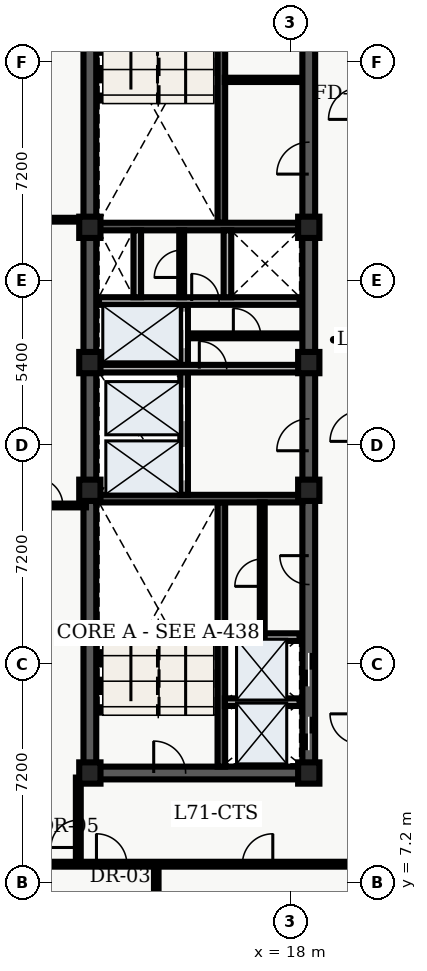
"""IFC4 building model, lengths in metres.
Left out: names, types, materials, properties, quantities, classifications, styles, units other than length and angle.
Written with IfcOpenShell. Run it as: python <this file> out.ifc"""

import sys

from ifc_helpers import new_model, entity, si_unit, converted_unit, direction, frame, origin_with_axes, origin_2d_with_axis, place, context, subcontext, project, spatial, polyline, rectangle, outline, extrude, element, fill, save


model = new_model("IFC4")
c1 = context("Model", 3, precision=1e-05, world=origin_with_axes(), true_north=direction((0.0, 1.0)))
c2 = subcontext(c1, "Body", "Model", "MODEL_VIEW")
j1 = project(units=[si_unit("LENGTHUNIT", "METRE"), converted_unit("PLANEANGLEUNIT", "DEGREE", entity("IfcPlaneAngleMeasure", 0.017), si_unit("PLANEANGLEUNIT", "RADIAN"), dimensions=[0, 0, 0, 0, 0, 0, 0])], contexts=[c1])
p1 = place(None, origin_with_axes())
s1 = spatial("IfcSite", under=j1, at=p1, CompositionType="ELEMENT")
p2 = place(p1, origin_with_axes())
s2 = spatial("IfcBuilding", under=s1, at=p2, CompositionType="ELEMENT")
p3 = place(p2, frame((0.0, 0.0, 288.0), z_axis=(0.0, 0.0, 1.0), x_axis=(1.0, 0.0, 0.0)))
s3 = spatial("IfcBuildingStorey", under=s2, at=p3, CompositionType="ELEMENT", Elevation=288.0)
p4 = place(p3, frame((11.4, 10.8, 0.0), z_axis=(0.0, 0.0, 1.0), x_axis=(0.0, 1.0, 0.0)))
e1 = element("IfcWall", 1, at=p4, inside=s3, PredefinedType="SHEAR", context=c2, shape_type="SweptSolid", body=[
    extrude(outline(polyline([(0.0, -0.21), (27.0, -0.21), (27.0, 0.21), (0.0, 0.21), (0.0, -0.21)])), origin_with_axes(), (0.0, 0.0, 1.0), 3.66),
])
p5 = place(p3, frame((11.4, 10.8, 0.0), z_axis=(0.0, 0.0, 1.0), x_axis=(1.0, 0.0, 0.0)))
e2 = element("IfcWall", 2, at=p5, inside=s3, PredefinedType="SHEAR", context=c2, shape_type="SweptSolid", body=[
    extrude(outline(polyline([(0.0, -0.21), (7.2, -0.21), (7.2, 0.21), (0.0, 0.21), (0.0, -0.21)])), origin_with_axes(), (0.0, 0.0, 1.0), 3.66),
])
p6 = place(p5, frame((2.625, 0.0, 0.0), z_axis=(0.0, 0.0, 1.0), x_axis=(1.0, 0.0, 0.0)))
e3 = element("IfcOpeningElement", 3, at=p6, cuts=e2, PredefinedType="OPENING", context=c2, shape_type="SweptSolid", body=[
    extrude(rectangle(XDim=1.05, YDim=0.44, at=origin_2d_with_axis()), origin_with_axes(), (0.0, 0.0, 1.0), 2.15),
])
p7 = place(p3, frame((18.6, 10.8, 0.0), z_axis=(0.0, 0.0, 1.0), x_axis=(0.0, 1.0, 0.0)))
e4 = element("IfcWall", 4, at=p7, inside=s3, PredefinedType="SHEAR", context=c2, shape_type="SweptSolid", body=[
    extrude(outline(polyline([(0.0, -0.21), (13.5, -0.21), (13.5, 0.21), (0.0, 0.21), (0.0, -0.21)])), origin_with_axes(), (0.0, 0.0, 1.0), 3.66),
])
p8 = place(p7, frame((1.3, 0.0, 0.0), z_axis=(0.0, 0.0, 1.0), x_axis=(1.0, 0.0, 0.0)))
e5 = element("IfcOpeningElement", 5, at=p8, cuts=e4, PredefinedType="OPENING", context=c2, shape_type="SweptSolid", body=[
    extrude(rectangle(XDim=1.1, YDim=0.44, at=origin_2d_with_axis()), origin_with_axes(), (0.0, 0.0, 1.0), 2.15),
])
p9 = place(p7, frame((3.4, 0.0, 0.0), z_axis=(0.0, 0.0, 1.0), x_axis=(1.0, 0.0, 0.0)))
e6 = element("IfcOpeningElement", 6, at=p9, cuts=e4, PredefinedType="OPENING", context=c2, shape_type="SweptSolid", body=[
    extrude(rectangle(XDim=1.1, YDim=0.44, at=origin_2d_with_axis()), origin_with_axes(), (0.0, 0.0, 1.0), 2.15),
])
p10 = place(p7, frame((11.125, 0.0, 0.0), z_axis=(0.0, 0.0, 1.0), x_axis=(1.0, 0.0, 0.0)))
e7 = element("IfcOpeningElement", 7, at=p10, cuts=e4, PredefinedType="OPENING", context=c2, shape_type="SweptSolid", body=[
    extrude(rectangle(XDim=1.05, YDim=0.44, at=origin_2d_with_axis()), origin_with_axes(), (0.0, 0.0, 1.0), 2.15),
])
p11 = place(p7, frame((6.675, 0.0, 0.0), z_axis=(0.0, 0.0, 1.0), x_axis=(1.0, 0.0, 0.0)))
e8 = element("IfcOpeningElement", 8, at=p11, cuts=e4, PredefinedType="OPENING", context=c2, shape_type="SweptSolid", body=[
    extrude(rectangle(XDim=0.95, YDim=0.44, at=origin_2d_with_axis()), origin_with_axes(), (0.0, 0.0, 1.0), 2.15),
])
p12 = place(p3, frame((18.6, 24.3, 0.0), z_axis=(0.0, 0.0, 1.0), x_axis=(0.0, 1.0, 0.0)))
e9 = element("IfcWall", 9, at=p12, inside=s3, PredefinedType="SHEAR", context=c2, shape_type="SweptSolid", body=[
    extrude(outline(polyline([(0.0, -0.21), (13.5, -0.21), (13.5, 0.21), (0.0, 0.21), (0.0, -0.21)])), origin_with_axes(), (0.0, 0.0, 1.0), 3.66),
])
p13 = place(p12, frame((6.725, 0.0, 0.0), z_axis=(0.0, 0.0, 1.0), x_axis=(1.0, 0.0, 0.0)))
e10 = element("IfcOpeningElement", 10, at=p13, cuts=e9, PredefinedType="OPENING", context=c2, shape_type="SweptSolid", body=[
    extrude(rectangle(XDim=1.05, YDim=0.44, at=origin_2d_with_axis()), origin_with_axes(), (0.0, 0.0, 1.0), 2.15),
])
p14 = place(p12, frame((11.125, 0.0, 0.0), z_axis=(0.0, 0.0, 1.0), x_axis=(1.0, 0.0, 0.0)))
e11 = element("IfcOpeningElement", 11, at=p14, cuts=e9, PredefinedType="OPENING", context=c2, shape_type="SweptSolid", body=[
    extrude(rectangle(XDim=1.05, YDim=0.44, at=origin_2d_with_axis()), origin_with_axes(), (0.0, 0.0, 1.0), 2.15),
])
p15 = place(p3, frame((15.725, 11.01, 0.0), z_axis=(0.0, 0.0, 1.0), x_axis=(0.0, 1.0, 0.0)))
e12 = element("IfcWall", 12, at=p15, inside=s3, PredefinedType="SHEAR", context=c2, shape_type="SweptSolid", body=[
    extrude(outline(polyline([(0.0, -0.125), (8.69, -0.125), (8.69, 0.125), (0.0, 0.125), (0.0, -0.125)])), origin_with_axes(), (0.0, 0.0, 1.0), 3.66),
])
p16 = place(p3, frame((11.61, 19.825, 0.0), z_axis=(0.0, 0.0, 1.0), x_axis=(1.0, 0.0, 0.0)))
e13 = element("IfcWall", 13, at=p16, inside=s3, PredefinedType="SHEAR", context=c2, shape_type="SweptSolid", body=[
    extrude(outline(polyline([(0.0, -0.125), (6.78, -0.125), (6.78, 0.125), (0.0, 0.125), (0.0, -0.125)])), origin_with_axes(), (0.0, 0.0, 1.0), 3.66),
])
p17 = place(p3, frame((15.725, 28.9, 0.0), z_axis=(0.0, 0.0, 1.0), x_axis=(0.0, 1.0, 0.0)))
e14 = element("IfcWall", 14, at=p17, inside=s3, PredefinedType="SHEAR", context=c2, shape_type="SweptSolid", body=[
    extrude(outline(polyline([(0.0, -0.125), (8.69, -0.125), (8.69, 0.125), (0.0, 0.125), (0.0, -0.125)])), origin_with_axes(), (0.0, 0.0, 1.0), 3.66),
])
p18 = place(p3, frame((11.61, 28.775, 0.0), z_axis=(0.0, 0.0, 1.0), x_axis=(1.0, 0.0, 0.0)))
e15 = element("IfcWall", 15, at=p18, inside=s3, PredefinedType="SHEAR", context=c2, shape_type="SweptSolid", body=[
    extrude(outline(polyline([(0.0, -0.125), (6.78, -0.125), (6.78, 0.125), (0.0, 0.125), (0.0, -0.125)])), origin_with_axes(), (0.0, 0.0, 1.0), 3.66),
])
p19 = place(p3, frame((14.5, 19.95, 0.0), z_axis=(0.0, 0.0, 1.0), x_axis=(0.0, 1.0, 0.0)))
e16 = element("IfcWall", 16, at=p19, inside=s3, PredefinedType="SOLIDWALL", context=c2, shape_type="SweptSolid", body=[
    extrude(outline(polyline([(0.0, -0.125), (6.25, -0.125), (6.25, 0.125), (0.0, 0.125), (0.0, -0.125)])), origin_with_axes(), (0.0, 0.0, 1.0), 2.7),
])
p20 = place(p19, frame((1.025, 0.0, 0.0), z_axis=(0.0, 0.0, 1.0), x_axis=(1.0, 0.0, 0.0)))
e17 = element("IfcOpeningElement", 17, at=p20, cuts=e16, PredefinedType="OPENING", context=c2, shape_type="SweptSolid", body=[
    extrude(rectangle(XDim=1.1, YDim=0.27, at=origin_2d_with_axis()), origin_with_axes(), (0.0, 0.0, 1.0), 2.15),
])
p21 = place(p19, frame((2.975, 0.0, 0.0), z_axis=(0.0, 0.0, 1.0), x_axis=(1.0, 0.0, 0.0)))
e18 = element("IfcOpeningElement", 18, at=p21, cuts=e16, PredefinedType="OPENING", context=c2, shape_type="SweptSolid", body=[
    extrude(rectangle(XDim=1.1, YDim=0.27, at=origin_2d_with_axis()), origin_with_axes(), (0.0, 0.0, 1.0), 2.15),
])
p22 = place(p19, frame((5.425, 0.0, 0.0), z_axis=(0.0, 0.0, 1.0), x_axis=(1.0, 0.0, 0.0)))
e19 = element("IfcOpeningElement", 19, at=p22, cuts=e16, PredefinedType="OPENING", context=c2, shape_type="SweptSolid", body=[
    extrude(rectangle(XDim=1.2, YDim=0.27, at=origin_2d_with_axis()), origin_with_axes(), (0.0, 0.0, 1.0), 2.15),
])
p23 = place(p3, frame((11.7, 24.1, 0.0), z_axis=(0.0, 0.0, 1.0), x_axis=(1.0, 0.0, 0.0)))
e20 = element("IfcWall", 20, at=p23, inside=s3, PredefinedType="SOLIDWALL", context=c2, shape_type="SweptSolid", body=[
    extrude(outline(polyline([(0.0, -0.125), (6.6, -0.125), (6.6, 0.125), (0.0, 0.125), (0.0, -0.125)])), origin_with_axes(), (0.0, 0.0, 1.0), 2.7),
])
p24 = place(p23, frame((3.75, 0.0, 0.0), z_axis=(0.0, 0.0, 1.0), x_axis=(1.0, 0.0, 0.0)))
e21 = element("IfcOpeningElement", 21, at=p24, cuts=e20, PredefinedType="OPENING", context=c2, shape_type="SweptSolid", body=[
    extrude(rectangle(XDim=0.9, YDim=0.27, at=origin_2d_with_axis()), origin_with_axes(), (0.0, 0.0, 1.0), 2.15),
])
p25 = place(p3, frame((11.7, 26.325, 0.0), z_axis=(0.0, 0.0, 1.0), x_axis=(1.0, 0.0, 0.0)))
e22 = element("IfcWall", 22, at=p25, inside=s3, PredefinedType="SOLIDWALL", context=c2, shape_type="SweptSolid", body=[
    extrude(outline(polyline([(0.0, -0.125), (6.6, -0.125), (6.6, 0.125), (0.0, 0.125), (0.0, -0.125)])), origin_with_axes(), (0.0, 0.0, 1.0), 2.7),
])
p26 = place(p25, frame((3.5, 0.0, 0.0), z_axis=(0.0, 0.0, 1.0), x_axis=(1.0, 0.0, 0.0)))
e23 = element("IfcOpeningElement", 23, at=p26, cuts=e22, PredefinedType="OPENING", context=c2, shape_type="SweptSolid", body=[
    extrude(rectangle(XDim=0.9, YDim=0.27, at=origin_2d_with_axis()), origin_with_axes(), (0.0, 0.0, 1.0), 2.15),
])
for number, where, z_axis, x_axis in (
    (24, (12.96, 26.45, 0.0), (0.0, 0.0, 1.0), (0.0, 1.0, 0.0)),
    (25, (15.925, 26.45, 0.0), (0.0, 0.0, 1.0), (0.0, 1.0, 0.0)),
):
    element("IfcWall", number, at=place(p3, frame(where, z_axis=z_axis, x_axis=x_axis)), inside=s3, PredefinedType="SOLIDWALL", context=c2, shape_type="SweptSolid", body=[
        extrude(outline(polyline([(0.0, -0.125), (2.2, -0.125), (2.2, 0.125), (0.0, 0.125), (0.0, -0.125)])), origin_with_axes(), (0.0, 0.0, 1.0), 2.7),
    ])
for number, where, z_axis, x_axis in (
    (26, (11.4, 10.8, 0.0), (0.0, 0.0, 1.0), (1.0, 0.0, 0.0)),
    (27, (11.4, 20.1, 0.0), (0.0, 0.0, 1.0), (1.0, 0.0, 0.0)),
    (28, (11.4, 24.3, 0.0), (0.0, 0.0, 1.0), (1.0, 0.0, 0.0)),
    (29, (11.4, 28.75, 0.0), (0.0, 0.0, 1.0), (1.0, 0.0, 0.0)),
    (30, (18.6, 10.8, 0.0), (0.0, 0.0, 1.0), (1.0, 0.0, 0.0)),
    (31, (18.6, 20.1, 0.0), (0.0, 0.0, 1.0), (1.0, 0.0, 0.0)),
    (32, (18.6, 24.3, 0.0), (0.0, 0.0, 1.0), (1.0, 0.0, 0.0)),
    (33, (18.6, 28.75, 0.0), (0.0, 0.0, 1.0), (1.0, 0.0, 0.0)),
):
    element("IfcColumn", number, at=place(p3, frame(where, z_axis=z_axis, x_axis=x_axis)), inside=s3, PredefinedType="COLUMN", context=c2, shape_type="SweptSolid", body=[
        extrude(rectangle(XDim=0.7, YDim=0.7, at=origin_2d_with_axis()), origin_with_axes(), (0.0, 0.0, 1.0), 3.9),
    ])
p27 = place(p3, frame((14.62, 25.18, 0.0), z_axis=(0.0, 0.0, 1.0), x_axis=(1.0, 0.0, 0.0)))
e34 = element("IfcWall", 34, at=p27, inside=s3, PredefinedType="PARTITIONING", context=c2, shape_type="SweptSolid", body=[
    extrude(outline(polyline([(0.0, -0.08), (3.68, -0.08), (3.68, 0.08), (0.0, 0.08), (0.0, -0.08)])), origin_with_axes(), (0.0, 0.0, 1.0), 2.7),
])
p28 = place(p27, frame((1.95, 0.0, 0.0), z_axis=(0.0, 0.0, 1.0), x_axis=(1.0, 0.0, 0.0)))
e35 = element("IfcOpeningElement", 35, at=p28, cuts=e34, PredefinedType="OPENING", context=c2, shape_type="SweptSolid", body=[
    extrude(rectangle(XDim=0.9, YDim=0.18, at=origin_2d_with_axis()), origin_with_axes(), (0.0, 0.0, 1.0), 2.15),
])
p29 = place(p3, frame((14.42, 26.45, 0.0), z_axis=(0.0, 0.0, 1.0), x_axis=(0.0, 1.0, 0.0)))
e36 = element("IfcWall", 36, at=p29, inside=s3, PredefinedType="PARTITIONING", context=c2, shape_type="SweptSolid", body=[
    extrude(outline(polyline([(0.0, -0.08), (2.2, -0.08), (2.2, 0.08), (0.0, 0.08), (0.0, -0.08)])), origin_with_axes(), (0.0, 0.0, 1.0), 2.7),
])
p30 = place(p29, frame((1.1, 0.0, 0.0), z_axis=(0.0, 0.0, 1.0), x_axis=(1.0, 0.0, 0.0)))
e37 = element("IfcOpeningElement", 37, at=p30, cuts=e36, PredefinedType="OPENING", context=c2, shape_type="SweptSolid", body=[
    extrude(rectangle(XDim=0.9, YDim=0.18, at=origin_2d_with_axis()), origin_with_axes(), (0.0, 0.0, 1.0), 2.15),
])
for number, where, z_axis, x_axis in (
    (38, (15.84, 13.13, 0.0), (0.0, 0.0, 1.0), (1.0, 0.0, 0.0)),
    (39, (15.84, 15.27, 0.0), (0.0, 0.0, 1.0), (1.0, 0.0, 0.0)),
):
    element("IfcWall", number, at=place(p3, frame(where, z_axis=z_axis, x_axis=x_axis)), inside=s3, PredefinedType="SOLIDWALL", context=c2, shape_type="SweptSolid", body=[
        extrude(outline(polyline([(0.0, -0.125), (2.46, -0.125), (2.46, 0.125), (0.0, 0.125), (0.0, -0.125)])), origin_with_axes(), (0.0, 0.0, 1.0), 2.7),
    ])
p31 = place(p3, frame((17.07, 15.34, 0.0), z_axis=(0.0, 0.0, 1.0), x_axis=(0.0, 1.0, 0.0)))
e40 = element("IfcWall", 40, at=p31, inside=s3, PredefinedType="PARTITIONING", context=c2, shape_type="SweptSolid", body=[
    extrude(outline(polyline([(0.0, -0.08), (4.36, -0.08), (4.36, 0.08), (0.0, 0.08), (0.0, -0.08)])), origin_with_axes(), (0.0, 0.0, 1.0), 2.7),
])
p32 = place(p31, frame((2.05, 0.0, 0.0), z_axis=(0.0, 0.0, 1.0), x_axis=(1.0, 0.0, 0.0)))
e41 = element("IfcOpeningElement", 41, at=p32, cuts=e40, PredefinedType="OPENING", context=c2, shape_type="SweptSolid", body=[
    extrude(rectangle(XDim=0.9, YDim=0.18, at=origin_2d_with_axis()), origin_with_axes(), (0.0, 0.0, 1.0), 2.15),
])
p33 = place(p3, frame((15.84, 33.6, 0.0), z_axis=(0.0, 0.0, 1.0), x_axis=(1.0, 0.0, 0.0)))
e42 = element("IfcWall", 42, at=p33, inside=s3, PredefinedType="PARTITIONING", context=c2, shape_type="SweptSolid", body=[
    extrude(outline(polyline([(0.0, -0.07), (2.46, -0.07), (2.46, 0.07), (0.0, 0.07), (0.0, -0.07)])), origin_with_axes(), (0.0, 0.0, 1.0), 2.7),
])
p34 = place(p3, frame((8.135, 7.8, 0.0), z_axis=(0.0, 0.0, 1.0), x_axis=(1.0, 0.0, 0.0)))
e43 = element("IfcWall", 43, at=p34, inside=s3, PredefinedType="PARTITIONING", context=c2, shape_type="SweptSolid", body=[
    extrude(outline(polyline([(0.0, -0.08), (12.165, -0.08), (12.165, 0.08), (0.0, 0.08), (0.0, -0.08)])), origin_with_axes(), (0.0, 0.0, 1.0), 2.7),
])
p35 = place(p34, frame((3.982, 0.0, 0.0), z_axis=(0.0, 0.0, 1.0), x_axis=(1.0, 0.0, 0.0)))
e44 = element("IfcOpeningElement", 44, at=p35, cuts=e43, PredefinedType="OPENING", context=c2, shape_type="SweptSolid", body=[
    extrude(rectangle(XDim=1.0, YDim=0.18, at=origin_2d_with_axis()), origin_with_axes(), (0.0, 0.0, 1.0), 2.15),
])
p36 = place(p34, frame((8.782, 0.0, 0.0), z_axis=(0.0, 0.0, 1.0), x_axis=(1.0, 0.0, 0.0)))
e45 = element("IfcOpeningElement", 45, at=p36, cuts=e43, PredefinedType="OPENING", context=c2, shape_type="SweptSolid", body=[
    extrude(rectangle(XDim=1.0, YDim=0.18, at=origin_2d_with_axis()), origin_with_axes(), (0.0, 0.0, 1.0), 2.15),
])
p37 = place(p3, frame((11.02, 7.8, 0.0), z_axis=(0.0, 0.0, 1.0), x_axis=(0.0, 1.0, 0.0)))
e46 = element("IfcWall", 46, at=p37, inside=s3, PredefinedType="PARTITIONING", context=c2, shape_type="SweptSolid", body=[
    extrude(outline(polyline([(0.0, -0.08), (2.85, -0.08), (2.85, 0.08), (0.0, 0.08), (0.0, -0.08)])), origin_with_axes(), (0.0, 0.0, 1.0), 2.7),
])
p38 = place(p37, frame((1.0, 0.0, 0.0), z_axis=(0.0, 0.0, 1.0), x_axis=(1.0, 0.0, 0.0)))
e47 = element("IfcOpeningElement", 47, at=p38, cuts=e46, PredefinedType="OPENING", context=c2, shape_type="SweptSolid", body=[
    extrude(rectangle(XDim=0.9, YDim=0.18, at=origin_2d_with_axis()), origin_with_axes(), (0.0, 0.0, 1.0), 2.15),
])
p39 = place(p3, frame((8.135, 19.6, 0.0), z_axis=(0.0, 0.0, 1.0), x_axis=(1.0, 0.0, 0.0)))
e48 = element("IfcWall", 48, at=p39, inside=s3, PredefinedType="PARTITIONING", context=c2, shape_type="SweptSolid", body=[
    extrude(outline(polyline([(0.0, -0.062), (3.135, -0.062), (3.135, 0.062), (0.0, 0.062), (0.0, -0.062)])), origin_with_axes(), (0.0, 0.0, 1.0), 2.7),
])
p40 = place(p39, frame((1.925, 0.0, 0.0), z_axis=(0.0, 0.0, 1.0), x_axis=(1.0, 0.0, 0.0)))
e49 = element("IfcOpeningElement", 49, at=p40, cuts=e48, PredefinedType="OPENING", context=c2, shape_type="SweptSolid", body=[
    extrude(rectangle(XDim=0.9, YDim=0.145, at=origin_2d_with_axis()), origin_with_axes(), (0.0, 0.0, 1.0), 2.15),
])
p41 = place(p3, frame((8.135, 29.0, 0.0), z_axis=(0.0, 0.0, 1.0), x_axis=(1.0, 0.0, 0.0)))
e50 = element("IfcWall", 50, at=p41, inside=s3, PredefinedType="PARTITIONING", context=c2, shape_type="SweptSolid", body=[
    extrude(outline(polyline([(0.0, -0.062), (3.135, -0.062), (3.135, 0.062), (0.0, 0.062), (0.0, -0.062)])), origin_with_axes(), (0.0, 0.0, 1.0), 2.7),
])
p42 = place(p3, frame((13.584, 2.58, 0.0), z_axis=(0.0, 0.0, 1.0), x_axis=(0.0, 1.0, 0.0)))
e51 = element("IfcWall", 51, at=p42, inside=s3, PredefinedType="PARTITIONING", context=c2, shape_type="SweptSolid", body=[
    extrude(outline(polyline([(0.0, -0.075), (5.12, -0.075), (5.12, 0.075), (0.0, 0.075), (0.0, -0.075)])), origin_with_axes(), (0.0, 0.0, 1.0), 2.7),
])
p43 = place(p7, frame((1.3, 0.0, 0.0), z_axis=(0.0, 0.0, 1.0), x_axis=(1.0, 0.0, 0.0)))
e52 = element("IfcDoor", 52, at=p43, inside=s3, OperationType="SLIDING_TO_LEFT", PredefinedType="DOOR", context=c2, shape_type="SweptSolid", body=[
    extrude(rectangle(XDim=1.1, YDim=0.09, at=origin_2d_with_axis()), origin_with_axes(), (0.0, 0.0, 1.0), 2.15),
])
fill(e5, e52)
p44 = place(p7, frame((3.4, 0.0, 0.0), z_axis=(0.0, 0.0, 1.0), x_axis=(1.0, 0.0, 0.0)))
e53 = element("IfcDoor", 53, at=p44, inside=s3, OperationType="SLIDING_TO_RIGHT", PredefinedType="DOOR", context=c2, shape_type="SweptSolid", body=[
    extrude(rectangle(XDim=1.1, YDim=0.09, at=origin_2d_with_axis()), origin_with_axes(), (0.0, 0.0, 1.0), 2.15),
])
fill(e6, e53)
p45 = place(p19, frame((1.025, 0.0, 0.0), z_axis=(0.0, 0.0, 1.0), x_axis=(1.0, 0.0, 0.0)))
e54 = element("IfcDoor", 54, at=p45, inside=s3, OperationType="SLIDING_TO_LEFT", PredefinedType="DOOR", context=c2, shape_type="SweptSolid", body=[
    extrude(rectangle(XDim=1.1, YDim=0.09, at=origin_2d_with_axis()), origin_with_axes(), (0.0, 0.0, 1.0), 2.15),
])
fill(e17, e54)
p46 = place(p19, frame((2.975, 0.0, 0.0), z_axis=(0.0, 0.0, 1.0), x_axis=(1.0, 0.0, 0.0)))
e55 = element("IfcDoor", 55, at=p46, inside=s3, OperationType="SLIDING_TO_RIGHT", PredefinedType="DOOR", context=c2, shape_type="SweptSolid", body=[
    extrude(rectangle(XDim=1.1, YDim=0.09, at=origin_2d_with_axis()), origin_with_axes(), (0.0, 0.0, 1.0), 2.15),
])
fill(e18, e55)
p47 = place(p19, frame((5.425, 0.0, 0.0), z_axis=(0.0, 0.0, 1.0), x_axis=(1.0, 0.0, 0.0)))
e56 = element("IfcDoor", 56, at=p47, inside=s3, OperationType="DOUBLE_DOOR_SLIDING", PredefinedType="DOOR", context=c2, shape_type="SweptSolid", body=[
    extrude(rectangle(XDim=1.2, YDim=0.09, at=origin_2d_with_axis()), origin_with_axes(), (0.0, 0.0, 1.0), 2.15),
])
fill(e19, e56)
p48 = place(p5, frame((2.625, 0.0, 0.0), z_axis=(0.0, 0.0, 1.0), x_axis=(1.0, 0.0, 0.0)))
e57 = element("IfcDoor", 57, at=p48, inside=s3, OperationType="SINGLE_SWING_LEFT", PredefinedType="DOOR", context=c2, shape_type="SweptSolid", body=[
    extrude(rectangle(XDim=1.05, YDim=0.09, at=origin_2d_with_axis()), origin_with_axes(), (0.0, 0.0, 1.0), 2.15),
])
fill(e3, e57)
p49 = place(p7, frame((11.125, 0.0, 0.0), z_axis=(0.0, 0.0, 1.0), x_axis=(1.0, 0.0, 0.0)))
e58 = element("IfcDoor", 58, at=p49, inside=s3, OperationType="SINGLE_SWING_LEFT", PredefinedType="DOOR", context=c2, shape_type="SweptSolid", body=[
    extrude(rectangle(XDim=1.05, YDim=0.09, at=origin_2d_with_axis()), origin_with_axes(), (0.0, 0.0, 1.0), 2.15),
])
fill(e7, e58)
p50 = place(p25, frame((3.5, 0.0, 0.0), z_axis=(0.0, 0.0, 1.0), x_axis=(1.0, 0.0, 0.0)))
e59 = element("IfcDoor", 59, at=p50, inside=s3, OperationType="SINGLE_SWING_LEFT", PredefinedType="DOOR", context=c2, shape_type="SweptSolid", body=[
    extrude(rectangle(XDim=0.9, YDim=0.09, at=origin_2d_with_axis()), origin_with_axes(), (0.0, 0.0, 1.0), 2.15),
])
fill(e23, e59)
p51 = place(p29, frame((1.1, 0.0, 0.0), z_axis=(0.0, 0.0, 1.0), x_axis=(1.0, 0.0, 0.0)))
e60 = element("IfcDoor", 60, at=p51, inside=s3, OperationType="SINGLE_SWING_LEFT", PredefinedType="DOOR", context=c2, shape_type="SweptSolid", body=[
    extrude(rectangle(XDim=0.9, YDim=0.09, at=origin_2d_with_axis()), origin_with_axes(), (0.0, 0.0, 1.0), 2.15),
])
fill(e37, e60)
p52 = place(p23, frame((3.75, 0.0, 0.0), z_axis=(0.0, 0.0, 1.0), x_axis=(1.0, 0.0, 0.0)))
e61 = element("IfcDoor", 61, at=p52, inside=s3, OperationType="SINGLE_SWING_LEFT", PredefinedType="DOOR", context=c2, shape_type="SweptSolid", body=[
    extrude(rectangle(XDim=0.9, YDim=0.09, at=origin_2d_with_axis()), origin_with_axes(), (0.0, 0.0, 1.0), 2.15),
])
fill(e21, e61)
p53 = place(p27, frame((1.95, 0.0, 0.0), z_axis=(0.0, 0.0, 1.0), x_axis=(1.0, 0.0, 0.0)))
e62 = element("IfcDoor", 62, at=p53, inside=s3, OperationType="SINGLE_SWING_LEFT", PredefinedType="DOOR", context=c2, shape_type="SweptSolid", body=[
    extrude(rectangle(XDim=0.9, YDim=0.09, at=origin_2d_with_axis()), origin_with_axes(), (0.0, 0.0, 1.0), 2.15),
])
fill(e35, e62)
p54 = place(p31, frame((2.05, 0.0, 0.0), z_axis=(0.0, 0.0, 1.0), x_axis=(1.0, 0.0, 0.0)))
e63 = element("IfcDoor", 63, at=p54, inside=s3, OperationType="SINGLE_SWING_LEFT", PredefinedType="DOOR", context=c2, shape_type="SweptSolid", body=[
    extrude(rectangle(XDim=0.9, YDim=0.09, at=origin_2d_with_axis()), origin_with_axes(), (0.0, 0.0, 1.0), 2.15),
])
fill(e41, e63)
p55 = place(p7, frame((6.675, 0.0, 0.0), z_axis=(0.0, 0.0, 1.0), x_axis=(1.0, 0.0, 0.0)))
e64 = element("IfcDoor", 64, at=p55, inside=s3, OperationType="SINGLE_SWING_RIGHT", PredefinedType="DOOR", context=c2, shape_type="SweptSolid", body=[
    extrude(rectangle(XDim=0.95, YDim=0.09, at=origin_2d_with_axis()), origin_with_axes(), (0.0, 0.0, 1.0), 2.15),
])
fill(e8, e64)
p56 = place(p12, frame((6.725, 0.0, 0.0), z_axis=(0.0, 0.0, 1.0), x_axis=(1.0, 0.0, 0.0)))
e65 = element("IfcDoor", 65, at=p56, inside=s3, OperationType="SINGLE_SWING_LEFT", PredefinedType="DOOR", context=c2, shape_type="SweptSolid", body=[
    extrude(rectangle(XDim=1.05, YDim=0.09, at=origin_2d_with_axis()), origin_with_axes(), (0.0, 0.0, 1.0), 2.15),
])
fill(e10, e65)
p57 = place(p37, frame((1.0, 0.0, 0.0), z_axis=(0.0, 0.0, 1.0), x_axis=(1.0, 0.0, 0.0)))
e66 = element("IfcDoor", 66, at=p57, inside=s3, OperationType="SINGLE_SWING_LEFT", PredefinedType="DOOR", context=c2, shape_type="SweptSolid", body=[
    extrude(rectangle(XDim=0.9, YDim=0.09, at=origin_2d_with_axis()), origin_with_axes(), (0.0, 0.0, 1.0), 2.15),
])
fill(e47, e66)
p58 = place(p39, frame((1.925, 0.0, 0.0), z_axis=(0.0, 0.0, 1.0), x_axis=(1.0, 0.0, 0.0)))
e67 = element("IfcDoor", 67, at=p58, inside=s3, OperationType="SINGLE_SWING_LEFT", PredefinedType="DOOR", context=c2, shape_type="SweptSolid", body=[
    extrude(rectangle(XDim=0.9, YDim=0.075, at=origin_2d_with_axis()), origin_with_axes(), (0.0, 0.0, 1.0), 2.15),
])
fill(e49, e67)
p59 = place(p34, frame((3.982, 0.0, 0.0), z_axis=(0.0, 0.0, 1.0), x_axis=(1.0, 0.0, 0.0)))
e68 = element("IfcDoor", 68, at=p59, inside=s3, OperationType="SINGLE_SWING_LEFT", PredefinedType="DOOR", context=c2, shape_type="SweptSolid", body=[
    extrude(rectangle(XDim=1.0, YDim=0.09, at=origin_2d_with_axis()), origin_with_axes(), (0.0, 0.0, 1.0), 2.15),
])
fill(e44, e68)
p60 = place(p34, frame((8.782, 0.0, 0.0), z_axis=(0.0, 0.0, 1.0), x_axis=(1.0, 0.0, 0.0)))
e69 = element("IfcDoor", 69, at=p60, inside=s3, OperationType="SINGLE_SWING_RIGHT", PredefinedType="DOOR", context=c2, shape_type="SweptSolid", body=[
    extrude(rectangle(XDim=1.0, YDim=0.09, at=origin_2d_with_axis()), origin_with_axes(), (0.0, 0.0, 1.0), 2.15),
])
fill(e45, e69)
save(model, sys.argv[1])
